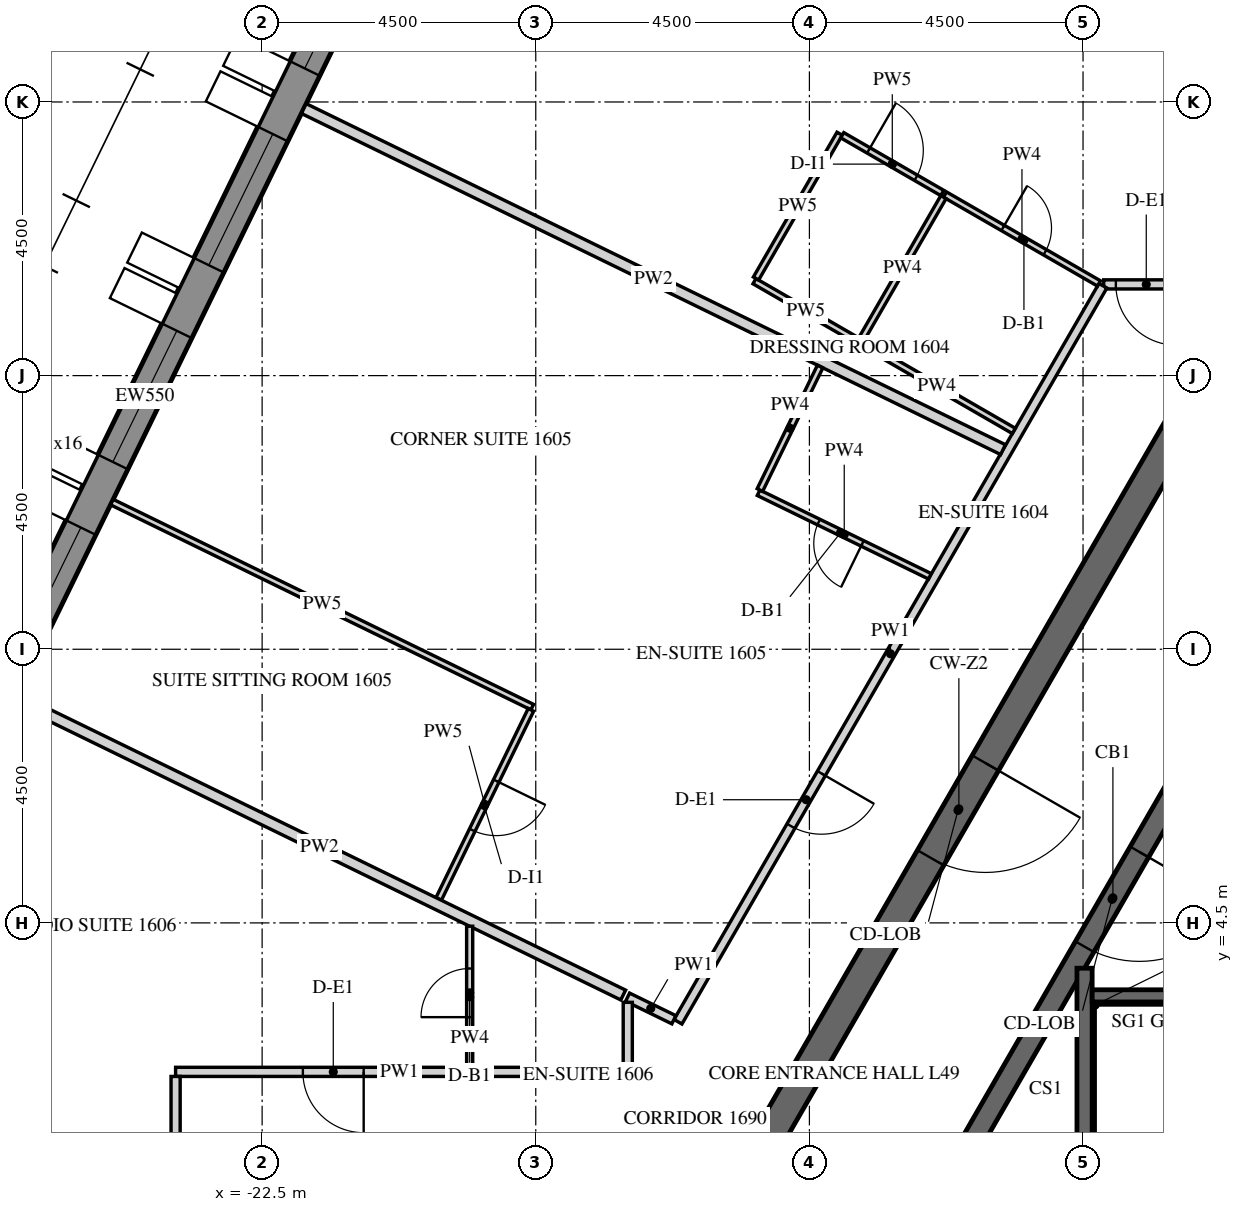
"""IFC4 building model, lengths in metres.
Left out: names, types, materials, properties, quantities, classifications, styles, units other than length and angle.
Written with IfcOpenShell. Run it as: python <this file> out.ifc"""

import sys

from ifc_helpers import new_model, si_unit, direction, frame, frame_2d, origin, place, context, subcontext, project, spatial, polyline, rectangle, outline, extrude, element, fill, save


model = new_model("IFC4")
c1 = context("Model", 3, precision=1e-05, world=origin(), true_north=direction((0.0, 1.0)))
c2 = subcontext(c1, "Body", "Model", "MODEL_VIEW")
j1 = project(units=[si_unit("LENGTHUNIT", "METRE"), si_unit("PLANEANGLEUNIT", "RADIAN")], contexts=[c1])
p1 = place(None, origin())
s1 = spatial("IfcSite", under=j1, at=p1, CompositionType="ELEMENT")
p2 = place(p1, origin())
s2 = spatial("IfcBuilding", under=s1, at=p2, CompositionType="ELEMENT")
p3 = place(p2, frame((0.0, 0.0, 207.3)))
s3 = spatial("IfcBuildingStorey", under=s2, at=p3, CompositionType="ELEMENT", Elevation=207.3)
p4 = place(p3, frame((-18.345, 25.633, -0.15), z_axis=(0.0, 0.0, 1.0), x_axis=(-0.43837181828, -0.898793718791, 0.0)))
e1 = element("IfcWall", 1, at=p4, inside=s3, PredefinedType="SOLIDWALL", context=c2, shape_type="SweptSolid", body=[
    extrude(outline(polyline([(-0.026, -0.275), (27.78, -0.275), (27.735, 0.275), (0.026, 0.275), (-0.026, -0.275)])), origin(), (0.0, 0.0, 1.0), 3.9),
])
p5 = place(p4, frame((1.879, 0.0, 1.05)))
e2 = element("IfcOpeningElement", 2, at=p5, cuts=e1, PredefinedType="OPENING", context=c2, shape_type="SweptSolid", body=[
    extrude(rectangle(XDim=2.4, YDim=2.4, at=frame_2d((1.2, 1.2))), frame((0.0, 0.285, 0.0), z_axis=(0.0, -1.0, 0.0), x_axis=(1.0, 0.0, 0.0)), (0.0, 0.0, 1.0), 0.57),
])
p6 = place(p4, frame((5.479, 0.0, 1.05)))
e3 = element("IfcOpeningElement", 3, at=p6, cuts=e1, PredefinedType="OPENING", context=c2, shape_type="SweptSolid", body=[
    extrude(rectangle(XDim=2.4, YDim=2.4, at=frame_2d((1.2, 1.2))), frame((0.0, 0.285, 0.0), z_axis=(0.0, -1.0, 0.0), x_axis=(1.0, 0.0, 0.0)), (0.0, 0.0, 1.0), 0.57),
])
p7 = place(p4, frame((9.079, 0.0, 1.05)))
e4 = element("IfcOpeningElement", 4, at=p7, cuts=e1, PredefinedType="OPENING", context=c2, shape_type="SweptSolid", body=[
    extrude(rectangle(XDim=2.4, YDim=2.4, at=frame_2d((1.2, 1.2))), frame((0.0, 0.285, 0.0), z_axis=(0.0, -1.0, 0.0), x_axis=(1.0, 0.0, 0.0)), (0.0, 0.0, 1.0), 0.57),
])
p8 = place(p4, frame((12.679, 0.0, 1.05)))
e5 = element("IfcOpeningElement", 5, at=p8, cuts=e1, PredefinedType="OPENING", context=c2, shape_type="SweptSolid", body=[
    extrude(rectangle(XDim=2.4, YDim=2.4, at=frame_2d((1.2, 1.2))), frame((0.0, 0.285, 0.0), z_axis=(0.0, -1.0, 0.0), x_axis=(1.0, 0.0, 0.0)), (0.0, 0.0, 1.0), 0.57),
])
p9 = place(p4, frame((16.279, 0.0, 1.05)))
e6 = element("IfcOpeningElement", 6, at=p9, cuts=e1, PredefinedType="OPENING", context=c2, shape_type="SweptSolid", body=[
    extrude(rectangle(XDim=2.4, YDim=2.4, at=frame_2d((1.2, 1.2))), frame((0.0, 0.285, 0.0), z_axis=(0.0, -1.0, 0.0), x_axis=(1.0, 0.0, 0.0)), (0.0, 0.0, 1.0), 0.57),
])
p10 = place(p4, frame((19.879, 0.0, 1.05)))
e7 = element("IfcOpeningElement", 7, at=p10, cuts=e1, PredefinedType="OPENING", context=c2, shape_type="SweptSolid", body=[
    extrude(rectangle(XDim=2.4, YDim=2.4, at=frame_2d((1.2, 1.2))), frame((0.0, 0.285, 0.0), z_axis=(0.0, -1.0, 0.0), x_axis=(1.0, 0.0, 0.0)), (0.0, 0.0, 1.0), 0.57),
])
p11 = place(p4, frame((23.479, 0.0, 1.05)))
e8 = element("IfcOpeningElement", 8, at=p11, cuts=e1, PredefinedType="OPENING", context=c2, shape_type="SweptSolid", body=[
    extrude(rectangle(XDim=2.4, YDim=2.4, at=frame_2d((1.2, 1.2))), frame((0.0, 0.285, 0.0), z_axis=(0.0, -1.0, 0.0), x_axis=(1.0, 0.0, 0.0)), (0.0, 0.0, 1.0), 0.57),
])
p12 = place(p3, frame((-7.361, 12.75, -0.15), z_axis=(0.0, 0.0, 1.0), x_axis=(-0.50000571537, -0.866022103989, 0.0)))
e9 = element("IfcWall", 9, at=p12, inside=s3, PredefinedType="SHEAR", context=c2, shape_type="SweptSolid", body=[
    extrude(outline(polyline([(-0.144, -0.25), (14.867, -0.25), (14.578, 0.25), (0.144, 0.25), (-0.144, -0.25)])), origin(), (0.0, 0.0, 1.0), 3.9),
])
p13 = place(p12, frame((6.49, 0.0, 0.15)))
e10 = element("IfcOpeningElement", 10, at=p13, cuts=e9, PredefinedType="OPENING", context=c2, shape_type="SweptSolid", body=[
    extrude(rectangle(XDim=1.8, YDim=2.4, at=frame_2d((0.9, 1.2))), frame((0.0, 0.26, 0.0), z_axis=(0.0, -1.0, 0.0), x_axis=(1.0, 0.0, 0.0)), (0.0, 0.0, 1.0), 0.52),
])
p14 = place(p3, frame((-5.673, 9.825, -0.15), z_axis=(0.0, 0.0, 1.0), x_axis=(-0.499995046907, -0.866028263435, 0.0)))
e11 = element("IfcWall", 11, at=p14, inside=s3, PredefinedType="SHEAR", context=c2, shape_type="SweptSolid", body=[
    extrude(outline(polyline([(-0.101, -0.175), (11.446, -0.175), (11.244, 0.175), (0.101, 0.175), (-0.101, -0.175)])), origin(), (0.0, 0.0, 1.0), 3.9),
])
p15 = place(p14, frame((4.801, 0.0, 0.15)))
e12 = element("IfcOpeningElement", 12, at=p15, cuts=e11, PredefinedType="OPENING", context=c2, shape_type="SweptSolid", body=[
    extrude(rectangle(XDim=1.8, YDim=2.4, at=frame_2d((0.9, 1.2))), frame((0.0, 0.185, 0.0), z_axis=(0.0, -1.0, 0.0), x_axis=(1.0, 0.0, 0.0)), (0.0, 0.0, 1.0), 0.37),
])
p16 = place(p3, frame((-8.975, -3.755, -0.25), z_axis=(0.0, 0.0, 1.0), x_axis=(0.0, 1.0, 0.0)))
e13 = element("IfcWall", 13, at=p16, inside=s3, PredefinedType="SHEAR", context=c2, shape_type="SweptSolid", body=[
    extrude(rectangle(XDim=7.51, YDim=0.25, at=frame_2d((3.755, 0.0))), origin(), (0.0, 0.0, 1.0), 3.9),
])
p17 = place(p3, frame((-8.85, 3.3, -0.25), z_axis=(0.0, 0.0, 1.0), x_axis=(1.0, 0.0, 0.0)))
e14 = element("IfcWall", 14, at=p17, inside=s3, PredefinedType="SHEAR", context=c2, shape_type="SweptSolid", body=[
    extrude(rectangle(XDim=2.95, YDim=0.2, at=frame_2d((1.475, 0.0))), origin(), (0.0, 0.0, 1.0), 3.9),
])
p18 = place(p3, frame((6.207, 15.0, 0.0), z_axis=(0.0, 0.0, 1.0), x_axis=(-1.0, 0.0, 0.0)))
e15 = element("IfcWall", 15, at=p18, inside=s3, PredefinedType="PARTITIONING", context=c2, shape_type="SweptSolid", body=[
    extrude(rectangle(XDim=14.867, YDim=0.15, at=frame_2d((7.433, 0.0))), origin(), (0.0, 0.0, 1.0), 2.988),
])
p19 = place(p18, frame((3.224, 0.0, 0.0)))
e16 = element("IfcOpeningElement", 16, at=p19, cuts=e15, PredefinedType="OPENING", context=c2, shape_type="SweptSolid", body=[
    extrude(rectangle(XDim=1.0, YDim=2.1, at=frame_2d((0.5, 1.05))), frame((0.0, 0.085, 0.0), z_axis=(0.0, -1.0, 0.0), x_axis=(1.0, 0.0, 0.0)), (0.0, 0.0, 1.0), 0.17),
])
p20 = place(p18, frame((7.224, 0.0, 0.0)))
e17 = element("IfcOpeningElement", 17, at=p20, cuts=e15, PredefinedType="OPENING", context=c2, shape_type="SweptSolid", body=[
    extrude(rectangle(XDim=1.0, YDim=2.1, at=frame_2d((0.5, 1.05))), frame((0.0, 0.085, 0.0), z_axis=(0.0, -1.0, 0.0), x_axis=(1.0, 0.0, 0.0)), (0.0, 0.0, 1.0), 0.17),
])
p21 = place(p18, frame((13.667, 0.0, 0.0)))
e18 = element("IfcOpeningElement", 18, at=p21, cuts=e15, PredefinedType="OPENING", context=c2, shape_type="SweptSolid", body=[
    extrude(rectangle(XDim=1.0, YDim=2.1, at=frame_2d((0.5, 1.05))), frame((0.0, 0.085, 0.0), z_axis=(0.0, -1.0, 0.0), x_axis=(1.0, 0.0, 0.0)), (0.0, 0.0, 1.0), 0.17),
])
p22 = place(p3, frame((-8.673, 14.978, 0.0), z_axis=(0.0, 0.0, 1.0), x_axis=(-0.500009245501, -0.866020065826, 0.0)))
e19 = element("IfcWall", 19, at=p22, inside=s3, PredefinedType="PARTITIONING", context=c2, shape_type="SweptSolid", body=[
    extrude(rectangle(XDim=13.976, YDim=0.15, at=frame_2d((6.988, 0.0))), origin(), (0.0, 0.0, 1.0), 2.988),
])
p23 = place(p22, frame((9.26, 0.0, 0.0)))
e20 = element("IfcOpeningElement", 20, at=p23, cuts=e19, PredefinedType="OPENING", context=c2, shape_type="SweptSolid", body=[
    extrude(rectangle(XDim=1.0, YDim=2.1, at=frame_2d((0.5, 1.05))), frame((0.0, 0.085, 0.0), z_axis=(0.0, -1.0, 0.0), x_axis=(1.0, 0.0, 0.0)), (0.0, 0.0, 1.0), 0.17),
])
p24 = place(p3, frame((-15.729, 2.907, 0.0), z_axis=(0.0, 0.0, 1.0), x_axis=(-0.898821061416, 0.438315753259, 0.0)))
e21 = element("IfcWall", 21, at=p24, inside=s3, PredefinedType="PARTITIONING", context=c2, shape_type="SweptSolid", body=[
    extrude(rectangle(XDim=0.847, YDim=0.15, at=frame_2d((0.424, 0.0))), origin(), (0.0, 0.0, 1.0), 2.988),
])
p25 = place(p3, frame((-16.562, 2.05, 0.0), z_axis=(0.0, 0.0, 1.0), x_axis=(-1.0, 0.0, 0.0)))
e22 = element("IfcWall", 22, at=p25, inside=s3, PredefinedType="PARTITIONING", context=c2, shape_type="SweptSolid", body=[
    extrude(rectangle(XDim=7.361, YDim=0.15, at=frame_2d((3.68, 0.0))), origin(), (0.0, 0.0, 1.0), 2.988),
])
p26 = place(p25, frame((4.268, 0.0, 0.0)))
e23 = element("IfcOpeningElement", 23, at=p26, cuts=e22, PredefinedType="OPENING", context=c2, shape_type="SweptSolid", body=[
    extrude(rectangle(XDim=1.0, YDim=2.1, at=frame_2d((0.5, 1.05))), frame((0.0, 0.085, 0.0), z_axis=(0.0, -1.0, 0.0), x_axis=(1.0, 0.0, 0.0)), (0.0, 0.0, 1.0), 0.17),
])
p27 = place(p3, frame((-23.923, 1.975, 0.0), z_axis=(0.0, 0.0, 1.0), x_axis=(0.0, -1.0, 0.0)))
e24 = element("IfcWall", 24, at=p27, inside=s3, PredefinedType="PARTITIONING", context=c2, shape_type="SweptSolid", body=[
    extrude(rectangle(XDim=1.725, YDim=0.15, at=frame_2d((0.863, 0.0))), origin(), (0.0, 0.0, 1.0), 2.988),
])
p28 = place(p3, frame((-16.487, 3.194, 0.0), z_axis=(0.0, 0.0, 1.0), x_axis=(0.0, -1.0, 0.0)))
e25 = element("IfcWall", 25, at=p28, inside=s3, PredefinedType="PARTITIONING", context=c2, shape_type="SweptSolid", body=[
    extrude(rectangle(XDim=1.144, YDim=0.15, at=frame_2d((0.572, 0.0))), origin(), (0.0, 0.0, 1.0), 2.988),
])
p29 = place(p3, frame((-10.138, 12.591, 0.0), z_axis=(0.0, 0.0, 1.0), x_axis=(-0.866025730634, 0.499999433879, 0.0)))
e26 = element("IfcWall", 26, at=p29, inside=s3, PredefinedType="PARTITIONING", context=c2, shape_type="SweptSolid", body=[
    extrude(rectangle(XDim=2.925, YDim=0.1, at=frame_2d((1.462, 0.0))), origin(), (0.0, 0.0, 1.0), 2.988),
])
p30 = place(p3, frame((-11.271, 16.478, 0.0), z_axis=(0.0, 0.0, 1.0), x_axis=(0.866046596414, -0.499963291492, 0.0)))
e27 = element("IfcWall", 27, at=p30, inside=s3, PredefinedType="PARTITIONING", context=c2, shape_type="SweptSolid", body=[
    extrude(rectangle(XDim=2.925, YDim=0.1, at=frame_2d((1.462, 0.0))), origin(), (0.0, 0.0, 1.0), 2.988),
])
p31 = place(p30, frame((1.1, 0.0, 0.0)))
e28 = element("IfcOpeningElement", 28, at=p31, cuts=e27, PredefinedType="OPENING", context=c2, shape_type="SweptSolid", body=[
    extrude(rectangle(XDim=0.8, YDim=2.1, at=frame_2d((0.4, 1.05))), frame((0.0, 0.06, 0.0), z_axis=(0.0, -1.0, 0.0), x_axis=(1.0, 0.0, 0.0)), (0.0, 0.0, 1.0), 0.12),
])
p32 = place(p3, frame((-12.714, 14.078, 0.0), z_axis=(0.0, 0.0, 1.0), x_axis=(-0.866000020948, 0.500043961785, 0.0)))
e29 = element("IfcWall", 29, at=p32, inside=s3, PredefinedType="PARTITIONING", context=c2, shape_type="SweptSolid", body=[
    extrude(rectangle(XDim=1.95, YDim=0.1, at=frame_2d((0.975, 0.0))), origin(), (0.0, 0.0, 1.0), 2.988),
])
p33 = place(p3, frame((-14.378, 15.096, 0.0), z_axis=(0.0, 0.0, 1.0), x_axis=(0.499996545922, 0.866027397988, 0.0)))
e30 = element("IfcWall", 30, at=p33, inside=s3, PredefinedType="PARTITIONING", context=c2, shape_type="SweptSolid", body=[
    extrude(rectangle(XDim=2.75, YDim=0.1, at=frame_2d((1.375, 0.0))), origin(), (0.0, 0.0, 1.0), 2.988),
])
p34 = place(p3, frame((-12.96, 17.453, 0.0), z_axis=(0.0, 0.0, 1.0), x_axis=(0.866044365799, -0.499967155389, 0.0)))
e31 = element("IfcWall", 31, at=p34, inside=s3, PredefinedType="PARTITIONING", context=c2, shape_type="SweptSolid", body=[
    extrude(rectangle(XDim=1.9, YDim=0.1, at=frame_2d((0.95, 0.0))), origin(), (0.0, 0.0, 1.0), 2.988),
])
p35 = place(p34, frame((0.5, 0.0, 0.0)))
e32 = element("IfcOpeningElement", 32, at=p35, cuts=e31, PredefinedType="OPENING", context=c2, shape_type="SweptSolid", body=[
    extrude(rectangle(XDim=0.9, YDim=2.1, at=frame_2d((0.45, 1.05))), frame((0.0, 0.06, 0.0), z_axis=(0.0, -1.0, 0.0), x_axis=(1.0, 0.0, 0.0)), (0.0, 0.0, 1.0), 0.12),
])
p36 = place(p3, frame((-21.815, 17.892, 0.0), z_axis=(0.0, 0.0, 1.0), x_axis=(0.898799253997, -0.438360469265, 0.0)))
e33 = element("IfcWall", 33, at=p36, inside=s3, PredefinedType="PARTITIONING", context=c2, shape_type="SweptSolid", body=[
    extrude(rectangle(XDim=12.794, YDim=0.18, at=frame_2d((6.397, 0.0))), origin(), (0.0, 0.0, 1.0), 2.988),
])
p37 = place(p3, frame((-11.296, 16.435, 0.0), z_axis=(0.0, 0.0, 1.0), x_axis=(-0.50000943426, -0.866019956843, 0.0)))
e34 = element("IfcWall", 34, at=p37, inside=s3, PredefinedType="PARTITIONING", context=c2, shape_type="SweptSolid", body=[
    extrude(rectangle(XDim=2.7, YDim=0.1, at=frame_2d((1.35, 0.0))), origin(), (0.0, 0.0, 1.0), 2.988),
])
p38 = place(p3, frame((-11.518, 10.199, 0.0), z_axis=(0.0, 0.0, 1.0), x_axis=(-0.898776679215, 0.438406752799, 0.0)))
e35 = element("IfcWall", 35, at=p38, inside=s3, PredefinedType="PARTITIONING", context=c2, shape_type="SweptSolid", body=[
    extrude(rectangle(XDim=3.135, YDim=0.1, at=frame_2d((1.567, 0.0))), origin(), (0.0, 0.0, 1.0), 2.988),
])
p39 = place(p38, frame((1.235, 0.0, 0.0)))
e36 = element("IfcOpeningElement", 36, at=p39, cuts=e35, PredefinedType="OPENING", context=c2, shape_type="SweptSolid", body=[
    extrude(rectangle(XDim=0.8, YDim=2.1, at=frame_2d((0.4, 1.05))), frame((0.0, 0.06, 0.0), z_axis=(0.0, -1.0, 0.0), x_axis=(1.0, 0.0, 0.0)), (0.0, 0.0, 1.0), 0.12),
])
p40 = place(p3, frame((-14.314, 11.619, 0.0), z_axis=(0.0, 0.0, 1.0), x_axis=(0.438376807268, 0.898791285477, 0.0)))
e37 = element("IfcWall", 37, at=p40, inside=s3, PredefinedType="PARTITIONING", context=c2, shape_type="SweptSolid", body=[
    extrude(rectangle(XDim=2.26, YDim=0.1, at=frame_2d((1.13, 0.0))), origin(), (0.0, 0.0, 1.0), 2.988),
])
p41 = place(p3, frame((-24.971, 11.42, 0.0), z_axis=(0.0, 0.0, 1.0), x_axis=(0.89880199998, -0.438354838951, 0.0)))
e38 = element("IfcWall", 38, at=p41, inside=s3, PredefinedType="PARTITIONING", context=c2, shape_type="SweptSolid", body=[
    extrude(rectangle(XDim=7.691, YDim=0.1, at=frame_2d((3.846, 0.0))), origin(), (0.0, 0.0, 1.0), 2.988),
])
p42 = place(p3, frame((-18.08, 8.004, 0.0), z_axis=(0.0, 0.0, 1.0), x_axis=(-0.438386097111, -0.898786754386, 0.0)))
e39 = element("IfcWall", 39, at=p42, inside=s3, PredefinedType="PARTITIONING", context=c2, shape_type="SweptSolid", body=[
    extrude(rectangle(XDim=3.46, YDim=0.1, at=frame_2d((1.73, 0.0))), origin(), (0.0, 0.0, 1.0), 2.988),
])
p43 = place(p42, frame((1.3, 0.0, 0.0)))
e40 = element("IfcOpeningElement", 40, at=p43, cuts=e39, PredefinedType="OPENING", context=c2, shape_type="SweptSolid", body=[
    extrude(rectangle(XDim=0.9, YDim=2.1, at=frame_2d((0.45, 1.05))), frame((0.0, 0.06, 0.0), z_axis=(0.0, -1.0, 0.0), x_axis=(1.0, 0.0, 0.0)), (0.0, 0.0, 1.0), 0.12),
])
p44 = place(p3, frame((-26.549, 8.185, 0.0), z_axis=(0.0, 0.0, 1.0), x_axis=(0.898799907013, -0.43835913034, 0.0)))
e41 = element("IfcWall", 41, at=p44, inside=s3, PredefinedType="PARTITIONING", context=c2, shape_type="SweptSolid", body=[
    extrude(rectangle(XDim=11.112, YDim=0.18, at=frame_2d((5.556, 0.0))), origin(), (0.0, 0.0, 1.0), 2.988),
])
p45 = place(p3, frame((-19.087, 2.125, 0.0), z_axis=(0.0, 0.0, 1.0), x_axis=(0.0, 1.0, 0.0)))
e42 = element("IfcWall", 42, at=p45, inside=s3, PredefinedType="PARTITIONING", context=c2, shape_type="SweptSolid", body=[
    extrude(rectangle(XDim=2.32, YDim=0.1, at=frame_2d((1.16, 0.0))), origin(), (0.0, 0.0, 1.0), 2.988),
])
p46 = place(p45, frame((0.825, 0.0, 0.0)))
e43 = element("IfcOpeningElement", 43, at=p46, cuts=e42, PredefinedType="OPENING", context=c2, shape_type="SweptSolid", body=[
    extrude(rectangle(XDim=0.8, YDim=2.1, at=frame_2d((0.4, 1.05))), frame((0.0, 0.06, 0.0), z_axis=(0.0, -1.0, 0.0), x_axis=(1.0, 0.0, 0.0)), (0.0, 0.0, 1.0), 0.12),
])
p47 = place(p6, frame((0.0, 0.205, 0.0)))
e44 = element("IfcWindow", 44, at=p47, inside=s3, PartitioningType="DOUBLE_PANEL_VERTICAL", PredefinedType="WINDOW", context=c2, shape_type="SweptSolid", body=[
    extrude(rectangle(XDim=2.4, YDim=2.4, at=frame_2d((1.2, 1.2))), frame((0.0, 0.03, 0.0), z_axis=(0.0, -1.0, 0.0), x_axis=(1.0, 0.0, 0.0)), (0.0, 0.0, 1.0), 0.06),
])
fill(e3, e44)
p48 = place(p7, frame((0.0, 0.205, 0.0)))
e45 = element("IfcWindow", 45, at=p48, inside=s3, PartitioningType="DOUBLE_PANEL_VERTICAL", PredefinedType="WINDOW", context=c2, shape_type="SweptSolid", body=[
    extrude(rectangle(XDim=2.4, YDim=2.4, at=frame_2d((1.2, 1.2))), frame((0.0, 0.03, 0.0), z_axis=(0.0, -1.0, 0.0), x_axis=(1.0, 0.0, 0.0)), (0.0, 0.0, 1.0), 0.06),
])
fill(e4, e45)
p49 = place(p8, frame((0.0, 0.205, 0.0)))
e46 = element("IfcWindow", 46, at=p49, inside=s3, PartitioningType="DOUBLE_PANEL_VERTICAL", PredefinedType="WINDOW", context=c2, shape_type="SweptSolid", body=[
    extrude(rectangle(XDim=2.4, YDim=2.4, at=frame_2d((1.2, 1.2))), frame((0.0, 0.03, 0.0), z_axis=(0.0, -1.0, 0.0), x_axis=(1.0, 0.0, 0.0)), (0.0, 0.0, 1.0), 0.06),
])
fill(e5, e46)
p50 = place(p9, frame((0.0, 0.205, 0.0)))
e47 = element("IfcWindow", 47, at=p50, inside=s3, PartitioningType="DOUBLE_PANEL_VERTICAL", PredefinedType="WINDOW", context=c2, shape_type="SweptSolid", body=[
    extrude(rectangle(XDim=2.4, YDim=2.4, at=frame_2d((1.2, 1.2))), frame((0.0, 0.03, 0.0), z_axis=(0.0, -1.0, 0.0), x_axis=(1.0, 0.0, 0.0)), (0.0, 0.0, 1.0), 0.06),
])
fill(e6, e47)
p51 = place(p13, origin())
e48 = element("IfcDoor", 48, at=p51, inside=s3, OperationType="DOUBLE_DOOR_SINGLE_SWING", PredefinedType="DOOR", context=c2, shape_type="SweptSolid", body=[
    extrude(rectangle(XDim=1.8, YDim=2.4, at=frame_2d((0.9, 1.2))), frame((0.0, 0.025, 0.0), z_axis=(0.0, -1.0, 0.0), x_axis=(1.0, 0.0, 0.0)), (0.0, 0.0, 1.0), 0.05),
])
fill(e10, e48)
p52 = place(p15, origin())
e49 = element("IfcDoor", 49, at=p52, inside=s3, OperationType="DOUBLE_DOOR_SINGLE_SWING", PredefinedType="DOOR", context=c2, shape_type="SweptSolid", body=[
    extrude(rectangle(XDim=1.8, YDim=2.4, at=frame_2d((0.9, 1.2))), frame((0.0, 0.025, 0.0), z_axis=(0.0, -1.0, 0.0), x_axis=(1.0, 0.0, 0.0)), (0.0, 0.0, 1.0), 0.05),
])
fill(e12, e49)
p53 = place(p21, origin())
e50 = element("IfcDoor", 50, at=p53, inside=s3, OperationType="SINGLE_SWING_LEFT", PredefinedType="DOOR", context=c2, shape_type="SweptSolid", body=[
    extrude(rectangle(XDim=1.0, YDim=2.1, at=frame_2d((0.5, 1.05))), frame((0.0, 0.025, 0.0), z_axis=(0.0, -1.0, 0.0), x_axis=(1.0, 0.0, 0.0)), (0.0, 0.0, 1.0), 0.05),
])
fill(e18, e50)
p54 = place(p31, origin())
e51 = element("IfcDoor", 51, at=p54, inside=s3, OperationType="SINGLE_SWING_LEFT", PredefinedType="DOOR", context=c2, shape_type="SweptSolid", body=[
    extrude(rectangle(XDim=0.8, YDim=2.1, at=frame_2d((0.4, 1.05))), frame((0.0, 0.025, 0.0), z_axis=(0.0, -1.0, 0.0), x_axis=(1.0, 0.0, 0.0)), (0.0, 0.0, 1.0), 0.05),
])
fill(e28, e51)
p55 = place(p35, origin())
e52 = element("IfcDoor", 52, at=p55, inside=s3, OperationType="SINGLE_SWING_LEFT", PredefinedType="DOOR", context=c2, shape_type="SweptSolid", body=[
    extrude(rectangle(XDim=0.9, YDim=2.1, at=frame_2d((0.45, 1.05))), frame((0.0, 0.025, 0.0), z_axis=(0.0, -1.0, 0.0), x_axis=(1.0, 0.0, 0.0)), (0.0, 0.0, 1.0), 0.05),
])
fill(e32, e52)
p56 = place(p23, origin())
e53 = element("IfcDoor", 53, at=p56, inside=s3, OperationType="SINGLE_SWING_RIGHT", PredefinedType="DOOR", context=c2, shape_type="SweptSolid", body=[
    extrude(rectangle(XDim=1.0, YDim=2.1, at=frame_2d((0.5, 1.05))), frame((0.0, 0.025, 0.0), z_axis=(0.0, -1.0, 0.0), x_axis=(1.0, 0.0, 0.0)), (0.0, 0.0, 1.0), 0.05),
])
fill(e20, e53)
p57 = place(p39, origin())
e54 = element("IfcDoor", 54, at=p57, inside=s3, OperationType="SINGLE_SWING_LEFT", PredefinedType="DOOR", context=c2, shape_type="SweptSolid", body=[
    extrude(rectangle(XDim=0.8, YDim=2.1, at=frame_2d((0.4, 1.05))), frame((0.0, 0.025, 0.0), z_axis=(0.0, -1.0, 0.0), x_axis=(1.0, 0.0, 0.0)), (0.0, 0.0, 1.0), 0.05),
])
fill(e36, e54)
p58 = place(p43, origin())
e55 = element("IfcDoor", 55, at=p58, inside=s3, OperationType="SINGLE_SWING_RIGHT", PredefinedType="DOOR", context=c2, shape_type="SweptSolid", body=[
    extrude(rectangle(XDim=0.9, YDim=2.1, at=frame_2d((0.45, 1.05))), frame((0.0, 0.025, 0.0), z_axis=(0.0, -1.0, 0.0), x_axis=(1.0, 0.0, 0.0)), (0.0, 0.0, 1.0), 0.05),
])
fill(e40, e55)
p59 = place(p26, origin())
e56 = element("IfcDoor", 56, at=p59, inside=s3, OperationType="SINGLE_SWING_RIGHT", PredefinedType="DOOR", context=c2, shape_type="SweptSolid", body=[
    extrude(rectangle(XDim=1.0, YDim=2.1, at=frame_2d((0.5, 1.05))), frame((0.0, 0.025, 0.0), z_axis=(0.0, -1.0, 0.0), x_axis=(1.0, 0.0, 0.0)), (0.0, 0.0, 1.0), 0.05),
])
fill(e23, e56)
p60 = place(p46, origin())
e57 = element("IfcDoor", 57, at=p60, inside=s3, OperationType="SINGLE_SWING_LEFT", PredefinedType="DOOR", context=c2, shape_type="SweptSolid", body=[
    extrude(rectangle(XDim=0.8, YDim=2.1, at=frame_2d((0.4, 1.05))), frame((0.0, 0.025, 0.0), z_axis=(0.0, -1.0, 0.0), x_axis=(1.0, 0.0, 0.0)), (0.0, 0.0, 1.0), 0.05),
])
fill(e43, e57)
save(model, sys.argv[1])
